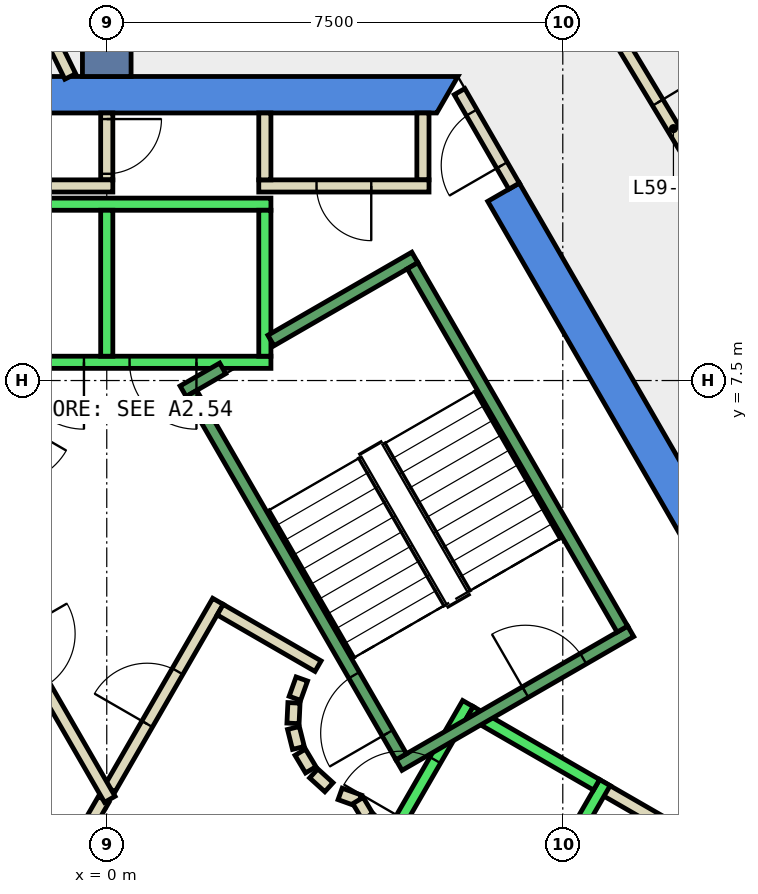
"""IFC4 building model, lengths in metres.
Left out: names, types, materials, properties, quantities, classifications, styles, units other than length and angle.
Written with IfcOpenShell. Run it as: python <this file> out.ifc"""

import sys

from ifc_helpers import new_model, si_unit, direction, frame, frame_2d, origin, place, context, subcontext, project, spatial, polyline, rectangle, outline, extrude, element, fill, save


model = new_model("IFC4")
c1 = context("Model", 3, precision=1e-05, world=origin(), true_north=direction((0.0, 1.0)))
c2 = subcontext(c1, "Body", "Model", "MODEL_VIEW")
j1 = project(units=[si_unit("LENGTHUNIT", "METRE"), si_unit("PLANEANGLEUNIT", "RADIAN")], contexts=[c1])
p1 = place(None, origin())
s1 = spatial("IfcSite", under=j1, at=p1, CompositionType="ELEMENT")
p2 = place(p1, origin())
s2 = spatial("IfcBuilding", under=s1, at=p2, CompositionType="ELEMENT")
p3 = place(p2, frame((0.0, 0.0, 259.4)))
s3 = spatial("IfcBuildingStorey", under=s2, at=p3, CompositionType="ELEMENT", Elevation=259.4)
p4 = place(p3, frame((0.0, 0.0, -0.34)))
e1 = element("IfcWall", 1, at=p4, inside=s3, PredefinedType="SHEAR", context=c2, shape_type="SweptSolid", body=[
    extrude(outline(polyline([(6.786, 10.747), (6.266, 10.447), (10.854, 2.5), (11.547, 2.5), (6.786, 10.747)])), origin(), (0.0, 0.0, 1.0), 3.6),
])
p5 = place(p3, frame((0.0, 0.0, -0.34)))
e2 = element("IfcWall", 2, at=p5, inside=s3, PredefinedType="SHEAR", context=c2, shape_type="SweptSolid", body=[
    extrude(outline(polyline([(5.774, 12.5), (-5.774, 12.5), (-5.427, 11.9), (5.427, 11.9), (5.774, 12.5)])), origin(), (0.0, 0.0, 1.0), 3.6),
])
p6 = place(p3, frame((0.0, 0.0, -0.34)))
e3 = element("IfcWall", 3, at=p6, inside=s3, PredefinedType="SHEAR", context=c2, shape_type="SweptSolid", body=[
    extrude(outline(polyline([(5.774, -7.5), (11.547, 2.5), (10.854, 2.5), (5.427, -6.9), (5.774, -7.5)])), origin(), (0.0, 0.0, 1.0), 3.6),
])
p7 = place(p3, frame((0.0, 12.5, -0.34), z_axis=(0.0, 0.0, 1.0), x_axis=(0.0, 1.0, 0.0)))
e4 = element("IfcWall", 4, at=p7, inside=s3, PredefinedType="SHEAR", context=c2, shape_type="SweptSolid", body=[
    extrude(rectangle(XDim=9.0, YDim=0.8, at=frame_2d((4.5, 0.0))), origin(), (0.0, 0.0, 1.0), 3.6),
])
p8 = place(p3, frame((-0.6, 12.5, 0.0), z_axis=(0.0, 0.0, 1.0), x_axis=(-0.440531456598, 0.897737175206, 0.0)))
e5 = element("IfcWall", 5, at=p8, inside=s3, PredefinedType="PARTITIONING", context=c2, shape_type="SweptSolid", body=[
    extrude(rectangle(XDim=1.918, YDim=0.2, at=frame_2d((0.959, 0.0))), origin(), (0.0, 0.0, 1.0), 3.26),
])
p9 = place(p3, frame((8.181, 13.532, 0.0), z_axis=(0.0, 0.0, 1.0), x_axis=(0.51625987265, -0.856431984393, 0.0)))
e6 = element("IfcWall", 6, at=p9, inside=s3, PredefinedType="PARTITIONING", context=c2, shape_type="SweptSolid", body=[
    extrude(rectangle(XDim=4.312, YDim=0.2, at=frame_2d((2.156, 0.0))), origin(), (0.0, 0.0, 1.0), 3.26),
])
p10 = place(p9, frame((1.706, 0.0, 0.0)))
e7 = element("IfcOpeningElement", 7, at=p10, cuts=e6, PredefinedType="OPENING", context=c2, shape_type="SweptSolid", body=[
    extrude(rectangle(XDim=1.0, YDim=2.1, at=frame_2d((0.5, 1.05))), frame((0.0, 0.11, 0.0), z_axis=(0.0, -1.0, 0.0), x_axis=(1.0, 0.0, 0.0)), (0.0, 0.0, 1.0), 0.22),
])
p11 = place(p3, frame((5.2, 11.9, 0.0), z_axis=(0.0, 0.0, 1.0), x_axis=(0.0, -1.0, 0.0)))
e8 = element("IfcWall", 8, at=p11, inside=s3, PredefinedType="PARTITIONING", context=c2, shape_type="SweptSolid", body=[
    extrude(rectangle(XDim=1.1, YDim=0.2, at=frame_2d((0.55, 0.0))), origin(), (0.0, 0.0, 1.0), 3.26),
])
p12 = place(p3, frame((5.3, 10.7, 0.0), z_axis=(0.0, 0.0, 1.0), x_axis=(-1.0, 0.0, 0.0)))
e9 = element("IfcWall", 9, at=p12, inside=s3, PredefinedType="PARTITIONING", context=c2, shape_type="SweptSolid", body=[
    extrude(rectangle(XDim=2.8, YDim=0.2, at=frame_2d((1.4, 0.0))), origin(), (0.0, 0.0, 1.0), 3.26),
])
p13 = place(p12, frame((0.95, 0.0, 0.0)))
e10 = element("IfcOpeningElement", 10, at=p13, cuts=e9, PredefinedType="OPENING", context=c2, shape_type="SweptSolid", body=[
    extrude(rectangle(XDim=0.9, YDim=2.1, at=frame_2d((0.45, 1.05))), frame((0.0, 0.11, 0.0), z_axis=(0.0, -1.0, 0.0), x_axis=(1.0, 0.0, 0.0)), (0.0, 0.0, 1.0), 0.22),
])
p14 = place(p3, frame((2.6, 10.8, 0.0), z_axis=(0.0, 0.0, 1.0), x_axis=(0.0, 1.0, 0.0)))
e11 = element("IfcWall", 11, at=p14, inside=s3, PredefinedType="PARTITIONING", context=c2, shape_type="SweptSolid", body=[
    extrude(rectangle(XDim=1.1, YDim=0.2, at=frame_2d((0.55, 0.0))), origin(), (0.0, 0.0, 1.0), 3.26),
])
p15 = place(p3, frame((0.0, 11.9, 0.0), z_axis=(0.0, 0.0, 1.0), x_axis=(0.0, -1.0, 0.0)))
e12 = element("IfcWall", 12, at=p15, inside=s3, PredefinedType="PARTITIONING", context=c2, shape_type="SweptSolid", body=[
    extrude(rectangle(XDim=1.1, YDim=0.2, at=frame_2d((0.55, 0.0))), origin(), (0.0, 0.0, 1.0), 3.26),
])
p16 = place(p15, frame((0.1, 0.0, 0.0)))
e13 = element("IfcOpeningElement", 13, at=p16, cuts=e12, PredefinedType="OPENING", context=c2, shape_type="SweptSolid", body=[
    extrude(rectangle(XDim=0.9, YDim=2.1, at=frame_2d((0.45, 1.05))), frame((0.0, 0.11, 0.0), z_axis=(0.0, -1.0, 0.0), x_axis=(1.0, 0.0, 0.0)), (0.0, 0.0, 1.0), 0.22),
])
p17 = place(p3, frame((0.1, 10.7, 0.0), z_axis=(0.0, 0.0, 1.0), x_axis=(-1.0, 0.0, 0.0)))
e14 = element("IfcWall", 14, at=p17, inside=s3, PredefinedType="PARTITIONING", context=c2, shape_type="SweptSolid", body=[
    extrude(rectangle(XDim=2.8, YDim=0.2, at=frame_2d((1.4, 0.0))), origin(), (0.0, 0.0, 1.0), 3.26),
])
p18 = place(p3, frame((8.141, 0.801, 0.0), z_axis=(0.0, 0.0, 1.0), x_axis=(0.866434738017, -0.499290341141, 0.0)))
e15 = element("IfcWall", 15, at=p18, inside=s3, PredefinedType="PARTITIONING", context=c2, shape_type="SweptSolid", body=[
    extrude(rectangle(XDim=1.5, YDim=0.2, at=frame_2d((0.75, 0.0))), origin(), (0.0, 0.0, 1.0), 3.26),
])
p19 = place(p3, frame((9.285, -4.818, 0.0), z_axis=(0.0, 0.0, 1.0), x_axis=(0.499962569651, 0.866047013128, 0.0)))
e16 = element("IfcWall", 16, at=p19, inside=s3, PredefinedType="PARTITIONING", context=c2, shape_type="SweptSolid", body=[
    extrude(rectangle(XDim=7.334, YDim=0.2, at=frame_2d((3.667, 0.0))), origin(), (0.0, 0.0, 1.0), 3.26),
])
p20 = place(p3, frame((-0.982, -1.0, 0.0), z_axis=(0.0, 0.0, 1.0), x_axis=(0.50024047865, 0.865886518847, 0.0)))
e17 = element("IfcWall", 17, at=p20, inside=s3, PredefinedType="PARTITIONING", context=c2, shape_type="SweptSolid", body=[
    extrude(rectangle(XDim=1.863, YDim=0.2, at=frame_2d((0.931, 0.0))), origin(), (0.0, 0.0, 1.0), 3.26),
])
p21 = place(p3, frame((0.05, 0.787, 0.0), z_axis=(0.0, 0.0, 1.0), x_axis=(0.499954076797, 0.866051915934, 0.0)))
e18 = element("IfcWall", 18, at=p21, inside=s3, PredefinedType="PARTITIONING", context=c2, shape_type="SweptSolid", body=[
    extrude(rectangle(XDim=3.558, YDim=0.2, at=frame_2d((1.779, 0.0))), origin(), (0.0, 0.0, 1.0), 3.26),
])
p22 = place(p21, frame((1.229, 0.0, 0.0)))
e19 = element("IfcOpeningElement", 19, at=p22, cuts=e18, PredefinedType="OPENING", context=c2, shape_type="SweptSolid", body=[
    extrude(rectangle(XDim=1.0, YDim=2.1, at=frame_2d((0.5, 1.05))), frame((0.0, 0.11, 0.0), z_axis=(0.0, -1.0, 0.0), x_axis=(1.0, 0.0, 0.0)), (0.0, 0.0, 1.0), 0.22),
])
p23 = place(p3, frame((1.866, 3.732, 0.0), z_axis=(0.0, 0.0, 1.0), x_axis=(0.866043361281, -0.499968895414, 0.0)))
e20 = element("IfcWall", 20, at=p23, inside=s3, PredefinedType="PARTITIONING", context=c2, shape_type="SweptSolid", body=[
    extrude(rectangle(XDim=1.858, YDim=0.2, at=frame_2d((0.929, 0.0))), origin(), (0.0, 0.0, 1.0), 3.26),
])
p24 = place(p3, frame((3.208, 2.592, 0.0), z_axis=(0.0, 0.0, 1.0), x_axis=(-0.337388820924, -0.941365382578, 0.0)))
e21 = element("IfcWall", 21, at=p24, inside=s3, PredefinedType="PARTITIONING", context=c2, shape_type="SweptSolid", body=[
    extrude(rectangle(XDim=0.338, YDim=0.2, at=frame_2d((0.169, 0.0))), origin(), (0.0, 0.0, 1.0), 3.26),
])
p25 = place(p3, frame((3.079, 2.199, 0.0), z_axis=(0.0, 0.0, 1.0), x_axis=(-0.047771483479, -0.998858290933, 0.0)))
e22 = element("IfcWall", 22, at=p25, inside=s3, PredefinedType="PARTITIONING", context=c2, shape_type="SweptSolid", body=[
    extrude(rectangle(XDim=0.337, YDim=0.2, at=frame_2d((0.169, 0.0))), origin(), (0.0, 0.0, 1.0), 3.26),
])
p26 = place(p3, frame((3.07, 1.786, 0.0), z_axis=(0.0, 0.0, 1.0), x_axis=(0.242705583207, -0.970099994784, 0.0)))
e23 = element("IfcWall", 23, at=p26, inside=s3, PredefinedType="PARTITIONING", context=c2, shape_type="SweptSolid", body=[
    extrude(rectangle(XDim=0.338, YDim=0.2, at=frame_2d((0.169, 0.0))), origin(), (0.0, 0.0, 1.0), 3.26),
])
for number, where, z_axis, x_axis in (
    (24, (3.182, 1.388, 0.0), (0.0, 0.0, 1.0), (0.512, -0.859, 0.0)),
    (25, (3.404, 1.039, 0.0), (0.0, 0.0, 1.0), (0.74, -0.672, 0.0)),
):
    element("IfcWall", number, at=place(p3, frame(where, z_axis=z_axis, x_axis=x_axis)), inside=s3, PredefinedType="PARTITIONING", context=c2, shape_type="SweptSolid", body=[
        extrude(rectangle(XDim=0.338, YDim=0.2, at=frame_2d((0.169, 0.0))), origin(), (0.0, 0.0, 1.0), 3.26),
    ])
p27 = place(p3, frame((3.838, 0.702, 0.0), z_axis=(0.0, 0.0, 1.0), x_axis=(0.941035081519, -0.338308993895, 0.0)))
e26 = element("IfcWall", 26, at=p27, inside=s3, PredefinedType="PARTITIONING", context=c2, shape_type="SweptSolid", body=[
    extrude(rectangle(XDim=0.337, YDim=0.2, at=frame_2d((0.168, 0.0))), origin(), (0.0, 0.0, 1.0), 3.26),
])
p28 = place(p3, frame((4.132, 0.593, 0.0), z_axis=(0.0, 0.0, 1.0), x_axis=(0.513561617048, -0.858052717201, 0.0)))
e27 = element("IfcWall", 27, at=p28, inside=s3, PredefinedType="PARTITIONING", context=c2, shape_type="SweptSolid", body=[
    extrude(rectangle(XDim=0.308, YDim=0.2, at=frame_2d((0.154, 0.0))), origin(), (0.0, 0.0, 1.0), 3.26),
])
p29 = place(p3, frame((4.301, 0.315, 0.0), z_axis=(0.0, 0.0, 1.0), x_axis=(0.741798017506, -0.670623367639, 0.0)))
e28 = element("IfcWall", 28, at=p29, inside=s3, PredefinedType="PARTITIONING", context=c2, shape_type="SweptSolid", body=[
    extrude(rectangle(XDim=0.309, YDim=0.2, at=frame_2d((0.154, 0.0))), origin(), (0.0, 0.0, 1.0), 3.26),
])
p30 = place(p3, frame((-2.54, 5.1, 0.0), z_axis=(0.0, 0.0, 1.0), x_axis=(0.499925051871, -0.866068670783, 0.0)))
e29 = element("IfcWall", 29, at=p30, inside=s3, PredefinedType="PARTITIONING", context=c2, shape_type="SweptSolid", body=[
    extrude(rectangle(XDim=5.181, YDim=0.2, at=frame_2d((2.59, 0.0))), origin(), (0.0, 0.0, 1.0), 3.26),
])
p31 = place(p30, frame((2.04, 0.0, 0.0)))
e30 = element("IfcOpeningElement", 30, at=p31, cuts=e29, PredefinedType="OPENING", context=c2, shape_type="SweptSolid", body=[
    extrude(rectangle(XDim=1.0, YDim=2.1, at=frame_2d((0.5, 1.05))), frame((0.0, 0.11, 0.0), z_axis=(0.0, -1.0, 0.0), x_axis=(1.0, 0.0, 0.0)), (0.0, 0.0, 1.0), 0.22),
])
p32 = place(p3, frame((6.699, 10.697, 0.0), z_axis=(0.0, 0.0, 1.0), x_axis=(-0.499914839587, 0.866074565589, 0.0)))
e31 = element("IfcWall", 31, at=p32, inside=s3, PredefinedType="PARTITIONING", context=c2, shape_type="SweptSolid", body=[
    extrude(rectangle(XDim=1.794, YDim=0.2, at=frame_2d((0.897, 0.0))), origin(), (0.0, 0.0, 1.0), 2.4),
])
p33 = place(p32, frame((0.397, 0.0, 0.0)))
e32 = element("IfcOpeningElement", 32, at=p33, cuts=e31, PredefinedType="OPENING", context=c2, shape_type="SweptSolid", body=[
    extrude(rectangle(XDim=1.0, YDim=2.1, at=frame_2d((0.5, 1.05))), frame((0.0, 0.11, 0.0), z_axis=(0.0, -1.0, 0.0), x_axis=(1.0, 0.0, 0.0)), (0.0, 0.0, 1.0), 0.22),
])
p34 = place(p3, frame((2.7, 7.8, 0.0), z_axis=(0.0, 0.0, 1.0), x_axis=(-1.0, 0.0, 0.0)))
e33 = element("IfcWall", 33, at=p34, inside=s3, PredefinedType="STANDARD", context=c2, shape_type="SweptSolid", body=[
    extrude(rectangle(XDim=5.4, YDim=0.2, at=frame_2d((2.7, 0.0))), origin(), (0.0, 0.0, 1.0), 3.26),
])
p35 = place(p34, frame((1.225, 0.0, 0.0)))
e34 = element("IfcOpeningElement", 34, at=p35, cuts=e33, PredefinedType="OPENING", context=c2, shape_type="SweptSolid", body=[
    extrude(rectangle(XDim=1.1, YDim=2.1, at=frame_2d((0.55, 1.05))), frame((0.0, 0.11, 0.0), z_axis=(0.0, -1.0, 0.0), x_axis=(1.0, 0.0, 0.0)), (0.0, 0.0, 1.0), 0.22),
])
p36 = place(p34, frame((3.075, 0.0, 0.0)))
e35 = element("IfcOpeningElement", 35, at=p36, cuts=e33, PredefinedType="OPENING", context=c2, shape_type="SweptSolid", body=[
    extrude(rectangle(XDim=1.1, YDim=2.1, at=frame_2d((0.55, 1.05))), frame((0.0, 0.11, 0.0), z_axis=(0.0, -1.0, 0.0), x_axis=(1.0, 0.0, 0.0)), (0.0, 0.0, 1.0), 0.22),
])
p37 = place(p3, frame((2.7, 10.4, 0.0), z_axis=(0.0, 0.0, 1.0), x_axis=(-1.0, 0.0, 0.0)))
e36 = element("IfcWall", 36, at=p37, inside=s3, PredefinedType="STANDARD", context=c2, shape_type="SweptSolid", body=[
    extrude(rectangle(XDim=5.4, YDim=0.2, at=frame_2d((2.7, 0.0))), origin(), (0.0, 0.0, 1.0), 3.26),
])
for number, where, z_axis, x_axis in (
    (37, (2.6, 7.9, 0.0), (0.0, 0.0, 1.0), (0.0, 1.0, 0.0)),
    (38, (0.0, 7.9, 0.0), (0.0, 0.0, 1.0), (0.0, 1.0, 0.0)),
):
    element("IfcWall", number, at=place(p3, frame(where, z_axis=z_axis, x_axis=x_axis)), inside=s3, PredefinedType="STANDARD", context=c2, shape_type="SweptSolid", body=[
        extrude(rectangle(XDim=2.4, YDim=0.2, at=frame_2d((1.2, 0.0))), origin(), (0.0, 0.0, 1.0), 3.26),
    ])
p38 = place(p3, frame((3.24, -2.488, 0.0), z_axis=(0.0, 0.0, 1.0), x_axis=(0.500034260056, 0.866005622828, 0.0)))
e39 = element("IfcWall", 39, at=p38, inside=s3, PredefinedType="STANDARD", context=c2, shape_type="SweptSolid", body=[
    extrude(rectangle(XDim=5.399, YDim=0.2, at=frame_2d((2.7, 0.0))), origin(), (0.0, 0.0, 1.0), 3.26),
])
p39 = place(p38, frame((3.225, 0.0, 0.0)))
e40 = element("IfcOpeningElement", 40, at=p39, cuts=e39, PredefinedType="OPENING", context=c2, shape_type="SweptSolid", body=[
    extrude(rectangle(XDim=1.1, YDim=2.1, at=frame_2d((0.55, 1.05))), frame((0.0, 0.11, 0.0), z_axis=(0.0, -1.0, 0.0), x_axis=(1.0, 0.0, 0.0)), (0.0, 0.0, 1.0), 0.22),
])
p40 = place(p38, frame((1.225, 0.0, 0.0)))
e41 = element("IfcOpeningElement", 41, at=p40, cuts=e39, PredefinedType="OPENING", context=c2, shape_type="SweptSolid", body=[
    extrude(rectangle(XDim=1.1, YDim=2.1, at=frame_2d((0.55, 1.05))), frame((0.0, 0.11, 0.0), z_axis=(0.0, -1.0, 0.0), x_axis=(1.0, 0.0, 0.0)), (0.0, 0.0, 1.0), 0.22),
])
p41 = place(p3, frame((5.492, -3.788, 0.0), z_axis=(0.0, 0.0, 1.0), x_axis=(0.500034260056, 0.866005622828, 0.0)))
e42 = element("IfcWall", 42, at=p41, inside=s3, PredefinedType="STANDARD", context=c2, shape_type="SweptSolid", body=[
    extrude(rectangle(XDim=5.399, YDim=0.2, at=frame_2d((2.7, 0.0))), origin(), (0.0, 0.0, 1.0), 3.26),
])
p42 = place(p3, frame((5.977, 2.052, 0.0), z_axis=(0.0, 0.0, 1.0), x_axis=(0.865973769406, -0.500089422704, 0.0)))
e43 = element("IfcWall", 43, at=p42, inside=s3, PredefinedType="STANDARD", context=c2, shape_type="SweptSolid", body=[
    extrude(rectangle(XDim=2.399, YDim=0.2, at=frame_2d((1.2, 0.0))), origin(), (0.0, 0.0, 1.0), 3.26),
])
p43 = place(p3, frame((4.806, 1.176, 0.0), z_axis=(0.0, 0.0, 1.0), x_axis=(0.866059941101, 0.499940174841, 0.0)))
e44 = element("IfcWall", 44, at=p43, inside=s3, PredefinedType="STANDARD", context=c2, shape_type="SweptSolid", body=[
    extrude(rectangle(XDim=4.4, YDim=0.2, at=frame_2d((2.2, 0.0))), origin(), (0.0, 0.0, 1.0), 3.26),
])
p44 = place(p43, frame((2.4, 0.0, 0.0)))
e45 = element("IfcOpeningElement", 45, at=p44, cuts=e44, PredefinedType="OPENING", context=c2, shape_type="SweptSolid", body=[
    extrude(rectangle(XDim=1.1, YDim=2.2, at=frame_2d((0.55, 1.1))), frame((0.0, 0.11, 0.0), z_axis=(0.0, -1.0, 0.0), x_axis=(1.0, 0.0, 0.0)), (0.0, 0.0, 1.0), 0.22),
])
p45 = place(p3, frame((2.7, 8.158, 0.0), z_axis=(0.0, 0.0, 1.0), x_axis=(0.86611865017, 0.499838457731, 0.0)))
e46 = element("IfcWall", 46, at=p45, inside=s3, PredefinedType="STANDARD", context=c2, shape_type="SweptSolid", body=[
    extrude(rectangle(XDim=2.733, YDim=0.2, at=frame_2d((1.366, 0.0))), origin(), (0.0, 0.0, 1.0), 3.26),
])
p46 = place(p3, frame((1.256, 7.324, 0.0), z_axis=(0.0, 0.0, 1.0), x_axis=(0.865915093549, 0.500191014278, 0.0)))
e47 = element("IfcWall", 47, at=p46, inside=s3, PredefinedType="STANDARD", context=c2, shape_type="SweptSolid", body=[
    extrude(rectangle(XDim=0.752, YDim=0.2, at=frame_2d((0.376, 0.0))), origin(), (0.0, 0.0, 1.0), 3.26),
])
p47 = place(p3, frame((4.843, 1.312, 0.0), z_axis=(0.0, 0.0, 1.0), x_axis=(-0.499963383562, 0.866046543262, 0.0)))
e48 = element("IfcWall", 48, at=p47, inside=s3, PredefinedType="STANDARD", context=c2, shape_type="SweptSolid", body=[
    extrude(rectangle(XDim=6.9, YDim=0.2, at=frame_2d((3.45, 0.0))), origin(), (0.0, 0.0, 1.0), 3.26),
])
p48 = place(p47, frame((0.45, 0.0, 0.0)))
e49 = element("IfcOpeningElement", 49, at=p48, cuts=e48, PredefinedType="OPENING", context=c2, shape_type="SweptSolid", body=[
    extrude(rectangle(XDim=1.1, YDim=2.2, at=frame_2d((0.55, 1.1))), frame((0.0, 0.11, 0.0), z_axis=(0.0, -1.0, 0.0), x_axis=(1.0, 0.0, 0.0)), (0.0, 0.0, 1.0), 0.22),
])
p49 = place(p3, frame((8.48, 3.412, 0.0), z_axis=(0.0, 0.0, 1.0), x_axis=(-0.499978703459, 0.866037698999, 0.0)))
e50 = element("IfcWall", 50, at=p49, inside=s3, PredefinedType="STANDARD", context=c2, shape_type="SweptSolid", body=[
    extrude(rectangle(XDim=6.9, YDim=0.2, at=frame_2d((3.45, 0.0))), origin(), (0.0, 0.0, 1.0), 3.26),
])
p50 = place(p10, origin())
e51 = element("IfcDoor", 51, at=p50, inside=s3, OperationType="SINGLE_SWING_LEFT", PredefinedType="DOOR", context=c2, shape_type="SweptSolid", body=[
    extrude(rectangle(XDim=1.0, YDim=2.1, at=frame_2d((0.5, 1.05))), frame((0.0, 0.025, 0.0), z_axis=(0.0, -1.0, 0.0), x_axis=(1.0, 0.0, 0.0)), (0.0, 0.0, 1.0), 0.05),
])
fill(e7, e51)
p51 = place(p22, origin())
e52 = element("IfcDoor", 52, at=p51, inside=s3, OperationType="SINGLE_SWING_RIGHT", PredefinedType="DOOR", context=c2, shape_type="SweptSolid", body=[
    extrude(rectangle(XDim=1.0, YDim=2.1, at=frame_2d((0.5, 1.05))), frame((0.0, 0.025, 0.0), z_axis=(0.0, -1.0, 0.0), x_axis=(1.0, 0.0, 0.0)), (0.0, 0.0, 1.0), 0.05),
])
fill(e19, e52)
p52 = place(p13, origin())
e53 = element("IfcDoor", 53, at=p52, inside=s3, OperationType="SINGLE_SWING_RIGHT", PredefinedType="DOOR", context=c2, shape_type="SweptSolid", body=[
    extrude(rectangle(XDim=0.9, YDim=2.1, at=frame_2d((0.45, 1.05))), frame((0.0, 0.025, 0.0), z_axis=(0.0, -1.0, 0.0), x_axis=(1.0, 0.0, 0.0)), (0.0, 0.0, 1.0), 0.05),
])
fill(e10, e53)
p53 = place(p16, origin())
e54 = element("IfcDoor", 54, at=p53, inside=s3, OperationType="SINGLE_SWING_LEFT", PredefinedType="DOOR", context=c2, shape_type="SweptSolid", body=[
    extrude(rectangle(XDim=0.9, YDim=2.1, at=frame_2d((0.45, 1.05))), frame((0.0, 0.025, 0.0), z_axis=(0.0, -1.0, 0.0), x_axis=(1.0, 0.0, 0.0)), (0.0, 0.0, 1.0), 0.05),
])
fill(e13, e54)
p54 = place(p33, origin())
e55 = element("IfcDoor", 55, at=p54, inside=s3, OperationType="SINGLE_SWING_LEFT", PredefinedType="DOOR", context=c2, shape_type="SweptSolid", body=[
    extrude(rectangle(XDim=1.0, YDim=2.1, at=frame_2d((0.5, 1.05))), frame((0.0, 0.025, 0.0), z_axis=(0.0, -1.0, 0.0), x_axis=(1.0, 0.0, 0.0)), (0.0, 0.0, 1.0), 0.05),
])
fill(e32, e55)
p55 = place(p35, origin())
e56 = element("IfcDoor", 56, at=p55, inside=s3, OperationType="SLIDING_TO_LEFT", PredefinedType="DOOR", context=c2, shape_type="SweptSolid", body=[
    extrude(rectangle(XDim=1.1, YDim=2.1, at=frame_2d((0.55, 1.05))), frame((0.0, 0.025, 0.0), z_axis=(0.0, -1.0, 0.0), x_axis=(1.0, 0.0, 0.0)), (0.0, 0.0, 1.0), 0.05),
])
fill(e34, e56)
p56 = place(p36, origin())
e57 = element("IfcDoor", 57, at=p56, inside=s3, OperationType="SLIDING_TO_LEFT", PredefinedType="DOOR", context=c2, shape_type="SweptSolid", body=[
    extrude(rectangle(XDim=1.1, YDim=2.1, at=frame_2d((0.55, 1.05))), frame((0.0, 0.025, 0.0), z_axis=(0.0, -1.0, 0.0), x_axis=(1.0, 0.0, 0.0)), (0.0, 0.0, 1.0), 0.05),
])
fill(e35, e57)
p57 = place(p39, origin())
e58 = element("IfcDoor", 58, at=p57, inside=s3, OperationType="SLIDING_TO_LEFT", PredefinedType="DOOR", context=c2, shape_type="SweptSolid", body=[
    extrude(rectangle(XDim=1.1, YDim=2.1, at=frame_2d((0.55, 1.05))), frame((0.0, 0.025, 0.0), z_axis=(0.0, -1.0, 0.0), x_axis=(1.0, 0.0, 0.0)), (0.0, 0.0, 1.0), 0.05),
])
fill(e40, e58)
p58 = place(p48, origin())
e59 = element("IfcDoor", 59, at=p58, inside=s3, OperationType="SINGLE_SWING_LEFT", PredefinedType="DOOR", context=c2, shape_type="SweptSolid", body=[
    extrude(rectangle(XDim=1.1, YDim=2.2, at=frame_2d((0.55, 1.1))), frame((0.0, 0.025, 0.0), z_axis=(0.0, -1.0, 0.0), x_axis=(1.0, 0.0, 0.0)), (0.0, 0.0, 1.0), 0.05),
])
fill(e49, e59)
p59 = place(p44, origin())
e60 = element("IfcDoor", 60, at=p59, inside=s3, OperationType="SINGLE_SWING_LEFT", PredefinedType="DOOR", context=c2, shape_type="SweptSolid", body=[
    extrude(rectangle(XDim=1.1, YDim=2.2, at=frame_2d((0.55, 1.1))), frame((0.0, 0.025, 0.0), z_axis=(0.0, -1.0, 0.0), x_axis=(1.0, 0.0, 0.0)), (0.0, 0.0, 1.0), 0.05),
])
fill(e45, e60)
save(model, sys.argv[1])
